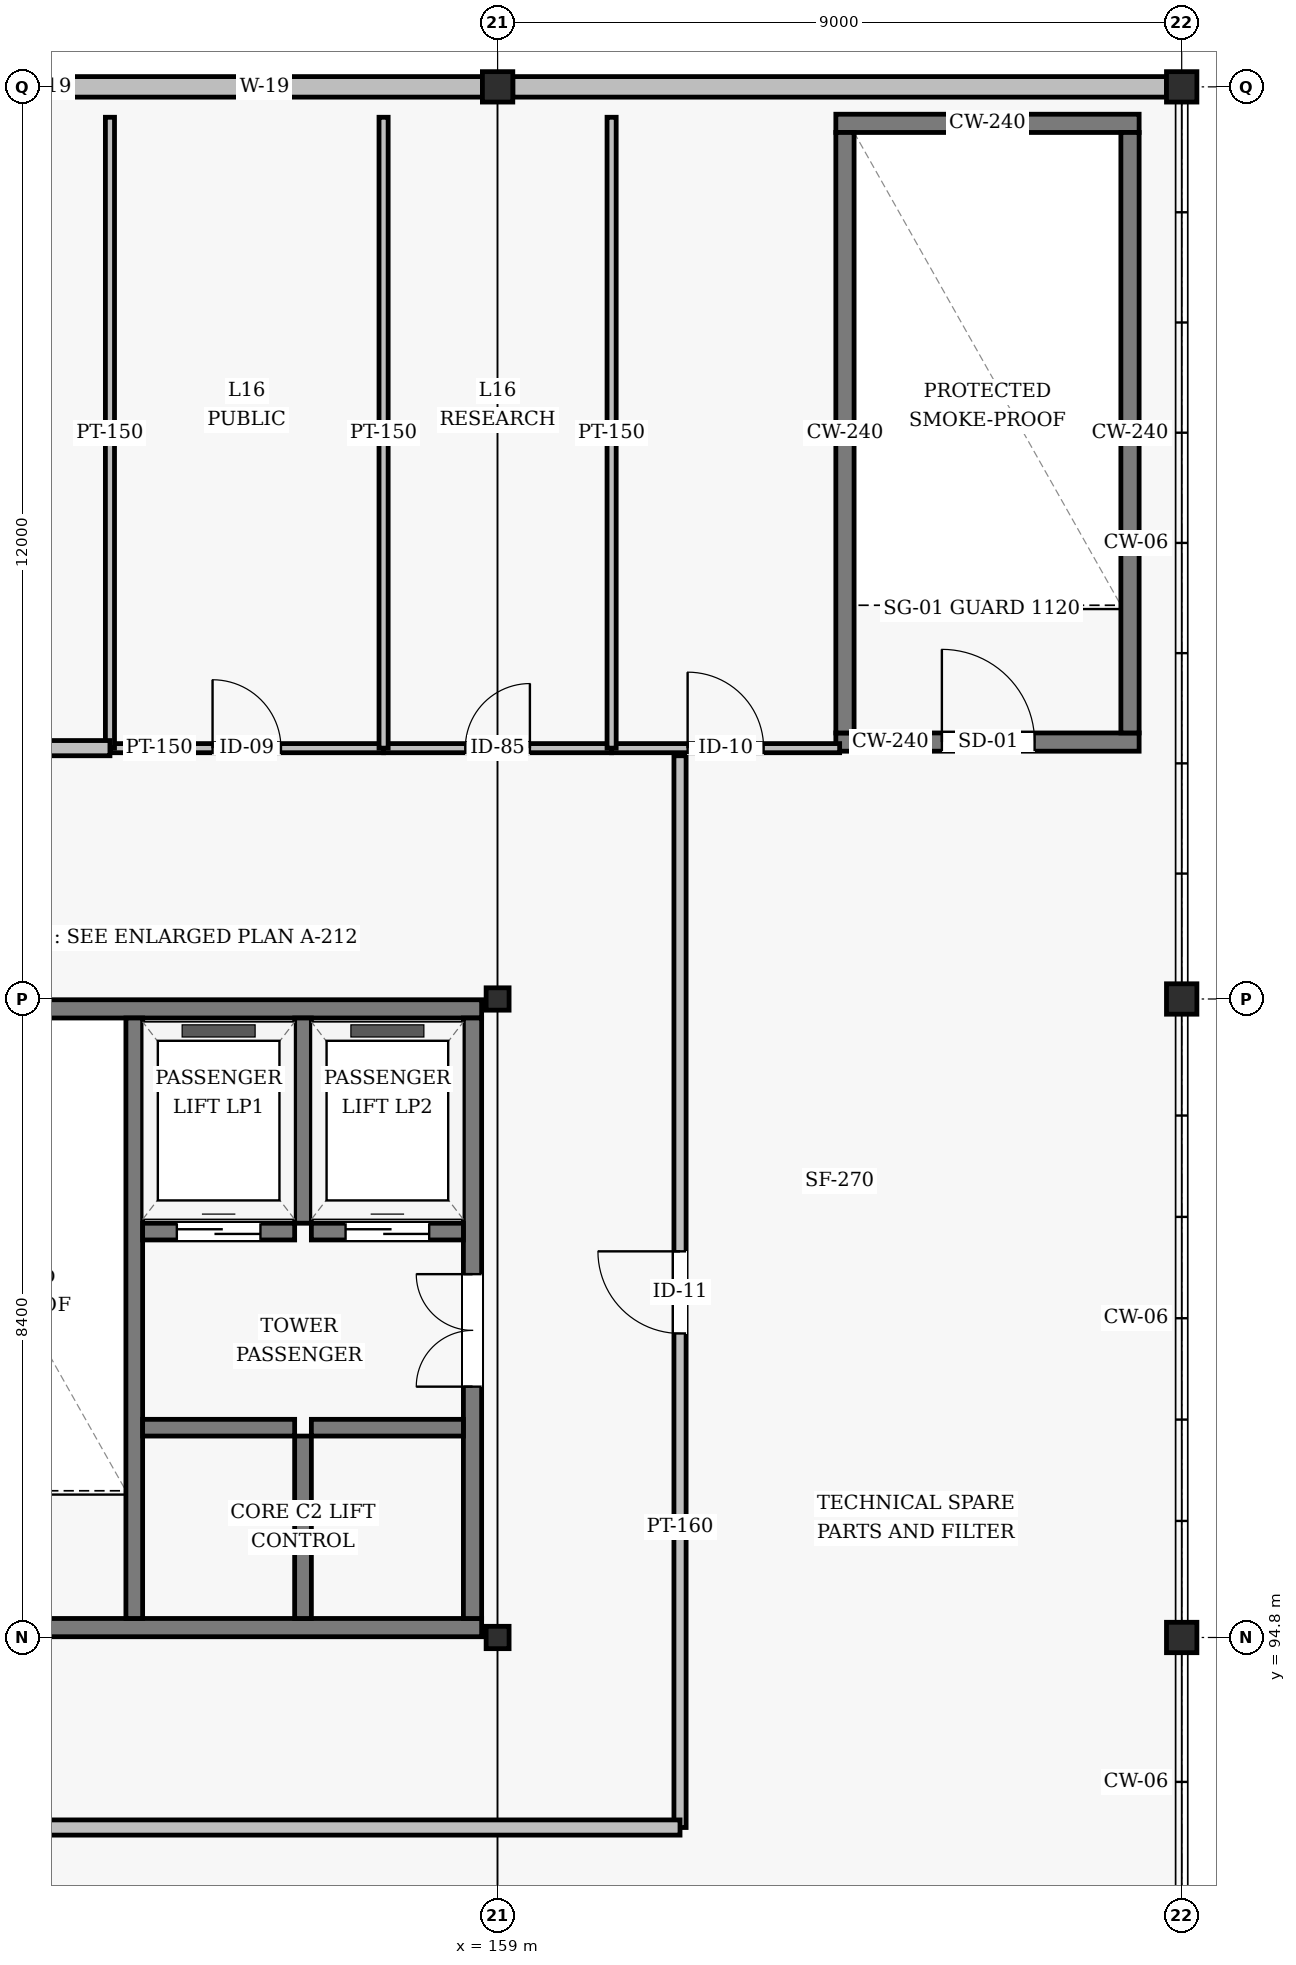
"""IFC4 building model, lengths in metres.
Left out: names, types, materials, properties, quantities, classifications, styles, units other than length and angle.
Written with IfcOpenShell. Run it as: python <this file> out.ifc"""

import sys

from ifc_helpers import new_model, si_unit, direction, frame, frame_2d, origin, origin_2d, place, context, subcontext, project, spatial, rectangle, hollow_rectangle, i_section, extrude, element, fill, save


model = new_model("IFC4")
c1 = context("Model", 3, precision=1e-05, world=origin(), true_north=direction((0.0, 1.0)))
c2 = subcontext(c1, "Body", "Model", "MODEL_VIEW")
j1 = project(units=[si_unit("LENGTHUNIT", "METRE"), si_unit("PLANEANGLEUNIT", "RADIAN")], contexts=[c1])
p1 = place(None, origin())
s1 = spatial("IfcSite", under=j1, at=p1, CompositionType="ELEMENT")
p2 = place(p1, origin())
s2 = spatial("IfcBuilding", under=s1, at=p2, CompositionType="ELEMENT")
p3 = place(p2, frame((0.0, 0.0, 61.2)))
s3 = spatial("IfcBuildingStorey", under=s2, at=p3, CompositionType="ELEMENT", Elevation=61.2)
for number, where, z_axis, x_axis in (
    (1, (159.0, 94.8, 0.0), (0.0, 0.0, 1.0), (1.0, 0.0, 0.0)),
    (2, (159.0, 103.2, 0.0), (0.0, 0.0, 1.0), (1.0, 0.0, 0.0)),
):
    element("IfcColumn", number, at=place(p3, frame(where, z_axis=z_axis, x_axis=x_axis)), inside=s3, PredefinedType="COLUMN", context=c2, shape_type="SweptSolid", body=[
        extrude(i_section(OverallWidth=0.302, OverallDepth=0.294, WebThickness=0.012, FlangeThickness=0.012, FilletRadius=0.018, at=origin_2d()), origin(), (0.0, 0.0, 1.0), 4.2),
    ])
for number, where, z_axis, x_axis in (
    (3, (159.0, 115.2, 0.0), (0.0, 0.0, 1.0), (1.0, 0.0, 0.0)),
    (4, (168.0, 94.8, 0.0), (0.0, 0.0, 1.0), (1.0, 0.0, 0.0)),
    (5, (168.0, 103.2, 0.0), (0.0, 0.0, 1.0), (1.0, 0.0, 0.0)),
    (6, (168.0, 115.2, 0.0), (0.0, 0.0, 1.0), (1.0, 0.0, 0.0)),
):
    element("IfcColumn", number, at=place(p3, frame(where, z_axis=z_axis, x_axis=x_axis)), inside=s3, PredefinedType="COLUMN", context=c2, shape_type="SweptSolid", body=[
        extrude(hollow_rectangle(XDim=0.4, YDim=0.4, WallThickness=0.016, InnerFilletRadius=0.016, OuterFilletRadius=0.032, at=origin_2d()), origin(), (0.0, 0.0, 1.0), 4.2),
    ])
p4 = place(p3, frame((167.8, 115.2, 0.0), z_axis=(0.0, 0.0, 1.0), x_axis=(-1.0, 0.0, 0.0)))
e7 = element("IfcWall", 7, at=p4, inside=s3, PredefinedType="SOLIDWALL", context=c2, shape_type="SweptSolid", body=[
    extrude(rectangle(XDim=8.6, YDim=0.27, at=frame_2d((4.3, 0.0))), origin(), (0.0, 0.0, 1.0), 3.51),
])
p5 = place(p3, frame((158.8, 115.2, 0.0), z_axis=(0.0, 0.0, 1.0), x_axis=(-1.0, 0.0, 0.0)))
e8 = element("IfcWall", 8, at=p5, inside=s3, PredefinedType="SOLIDWALL", context=c2, shape_type="SweptSolid", body=[
    extrude(rectangle(XDim=8.6, YDim=0.27, at=frame_2d((4.3, 0.0))), origin(), (0.0, 0.0, 1.0), 3.51),
])
p6 = place(p5, frame((2.542, 0.0, 1.35)))
e9 = element("IfcOpeningElement", 9, at=p6, cuts=e8, PredefinedType="OPENING", context=c2, shape_type="SweptSolid", body=[
    extrude(rectangle(XDim=0.65, YDim=1.2, at=frame_2d((0.325, 0.6))), frame((0.0, 0.145, 0.0), z_axis=(0.0, -1.0, 0.0), x_axis=(1.0, 0.0, 0.0)), (0.0, 0.0, 1.0), 0.29),
])
p7 = place(p5, frame((5.408, 0.0, 1.35)))
e10 = element("IfcOpeningElement", 10, at=p7, cuts=e8, PredefinedType="OPENING", context=c2, shape_type="SweptSolid", body=[
    extrude(rectangle(XDim=0.65, YDim=1.2, at=frame_2d((0.325, 0.6))), frame((0.0, 0.145, 0.0), z_axis=(0.0, -1.0, 0.0), x_axis=(1.0, 0.0, 0.0)), (0.0, 0.0, 1.0), 0.29),
])
p8 = place(p3, frame((150.02, 94.93, 0.0), z_axis=(0.0, 0.0, 1.0), x_axis=(1.0, 0.0, 0.0)))
e11 = element("IfcWall", 11, at=p8, inside=s3, PredefinedType="SHEAR", context=c2, shape_type="SweptSolid", body=[
    extrude(rectangle(XDim=8.77, YDim=0.24, at=frame_2d((4.385, 0.0))), origin(), (0.0, 0.0, 1.0), 3.96),
])
p9 = place(p8, frame((1.79, 0.0, 0.0)))
e12 = element("IfcOpeningElement", 12, at=p9, cuts=e11, PredefinedType="OPENING", context=c2, shape_type="SweptSolid", body=[
    extrude(rectangle(XDim=1.22, YDim=2.18, at=frame_2d((0.61, 1.09))), frame((0.0, 0.13, 0.0), z_axis=(0.0, -1.0, 0.0), x_axis=(1.0, 0.0, 0.0)), (0.0, 0.0, 1.0), 0.26),
])
p10 = place(p3, frame((150.02, 103.07, 0.0), z_axis=(0.0, 0.0, 1.0), x_axis=(1.0, 0.0, 0.0)))
e13 = element("IfcWall", 13, at=p10, inside=s3, PredefinedType="SHEAR", context=c2, shape_type="SweptSolid", body=[
    extrude(rectangle(XDim=8.77, YDim=0.24, at=frame_2d((4.385, 0.0))), origin(), (0.0, 0.0, 1.0), 3.96),
])
p11 = place(p3, frame((154.22, 95.05, 0.0), z_axis=(0.0, 0.0, 1.0), x_axis=(0.0, 1.0, 0.0)))
e14 = element("IfcWall", 14, at=p11, inside=s3, PredefinedType="SHEAR", context=c2, shape_type="SweptSolid", body=[
    extrude(rectangle(XDim=7.9, YDim=0.22, at=frame_2d((3.95, 0.0))), origin(), (0.0, 0.0, 1.0), 3.96),
])
p12 = place(p3, frame((158.67, 95.05, 0.0), z_axis=(0.0, 0.0, 1.0), x_axis=(0.0, 1.0, 0.0)))
e15 = element("IfcWall", 15, at=p12, inside=s3, PredefinedType="SHEAR", context=c2, shape_type="SweptSolid", body=[
    extrude(rectangle(XDim=7.9, YDim=0.24, at=frame_2d((3.95, 0.0))), origin(), (0.0, 0.0, 1.0), 3.96),
])
p13 = place(p12, frame((3.05, 0.0, 0.0)))
e16 = element("IfcOpeningElement", 16, at=p13, cuts=e15, PredefinedType="OPENING", context=c2, shape_type="SweptSolid", body=[
    extrude(rectangle(XDim=1.48, YDim=2.22, at=frame_2d((0.74, 1.11))), frame((0.0, 0.13, 0.0), z_axis=(0.0, -1.0, 0.0), x_axis=(1.0, 0.0, 0.0)), (0.0, 0.0, 1.0), 0.26),
])
p14 = place(p3, frame((156.44, 100.25, 0.0), z_axis=(0.0, 0.0, 1.0), x_axis=(0.0, 1.0, 0.0)))
e17 = element("IfcWall", 17, at=p14, inside=s3, PredefinedType="SHEAR", context=c2, shape_type="SweptSolid", body=[
    extrude(rectangle(XDim=2.7, YDim=0.22, at=frame_2d((1.35, 0.0))), origin(), (0.0, 0.0, 1.0), 3.96),
])
p15 = place(p3, frame((154.33, 100.14, 0.0), z_axis=(0.0, 0.0, 1.0), x_axis=(1.0, 0.0, 0.0)))
e18 = element("IfcWall", 18, at=p15, inside=s3, PredefinedType="SHEAR", context=c2, shape_type="SweptSolid", body=[
    extrude(rectangle(XDim=2.0, YDim=0.22, at=frame_2d((1.0, 0.0))), origin(), (0.0, 0.0, 1.0), 3.96),
])
p16 = place(p15, frame((0.45, 0.0, 0.0)))
e19 = element("IfcOpeningElement", 19, at=p16, cuts=e18, PredefinedType="OPENING", context=c2, shape_type="SweptSolid", body=[
    extrude(rectangle(XDim=1.1, YDim=2.15, at=frame_2d((0.55, 1.075))), frame((0.0, 0.12, 0.0), z_axis=(0.0, -1.0, 0.0), x_axis=(1.0, 0.0, 0.0)), (0.0, 0.0, 1.0), 0.24),
])
p17 = place(p3, frame((156.55, 100.14, 0.0), z_axis=(0.0, 0.0, 1.0), x_axis=(1.0, 0.0, 0.0)))
e20 = element("IfcWall", 20, at=p17, inside=s3, PredefinedType="SHEAR", context=c2, shape_type="SweptSolid", body=[
    extrude(rectangle(XDim=2.0, YDim=0.22, at=frame_2d((1.0, 0.0))), origin(), (0.0, 0.0, 1.0), 3.96),
])
p18 = place(p17, frame((0.45, 0.0, 0.0)))
e21 = element("IfcOpeningElement", 21, at=p18, cuts=e20, PredefinedType="OPENING", context=c2, shape_type="SweptSolid", body=[
    extrude(rectangle(XDim=1.1, YDim=2.15, at=frame_2d((0.55, 1.075))), frame((0.0, 0.12, 0.0), z_axis=(0.0, -1.0, 0.0), x_axis=(1.0, 0.0, 0.0)), (0.0, 0.0, 1.0), 0.24),
])
p19 = place(p3, frame((156.44, 95.05, 0.0), z_axis=(0.0, 0.0, 1.0), x_axis=(0.0, 1.0, 0.0)))
e22 = element("IfcWall", 22, at=p19, inside=s3, PredefinedType="SHEAR", context=c2, shape_type="SweptSolid", body=[
    extrude(rectangle(XDim=2.4, YDim=0.22, at=frame_2d((1.2, 0.0))), origin(), (0.0, 0.0, 1.0), 3.96),
])
for number, where, z_axis, x_axis in (
    (23, (154.33, 97.56, 0.0), (0.0, 0.0, 1.0), (1.0, 0.0, 0.0)),
    (24, (156.55, 97.56, 0.0), (0.0, 0.0, 1.0), (1.0, 0.0, 0.0)),
):
    element("IfcWall", number, at=place(p3, frame(where, z_axis=z_axis, x_axis=x_axis)), inside=s3, PredefinedType="SHEAR", context=c2, shape_type="SweptSolid", body=[
        extrude(rectangle(XDim=2.0, YDim=0.22, at=frame_2d((1.0, 0.0))), origin(), (0.0, 0.0, 1.0), 3.96),
    ])
p20 = place(p3, frame((163.45, 106.58, 0.0), z_axis=(0.0, 0.0, 1.0), x_axis=(1.0, 0.0, 0.0)))
e25 = element("IfcWall", 25, at=p20, inside=s3, PredefinedType="SHEAR", context=c2, shape_type="SweptSolid", body=[
    extrude(rectangle(XDim=3.99, YDim=0.24, at=frame_2d((1.995, 0.0))), origin(), (0.0, 0.0, 1.0), 3.96),
])
p21 = place(p20, frame((1.395, 0.0, 0.0)))
e26 = element("IfcOpeningElement", 26, at=p21, cuts=e25, PredefinedType="OPENING", context=c2, shape_type="SweptSolid", body=[
    extrude(rectangle(XDim=1.22, YDim=2.18, at=frame_2d((0.61, 1.09))), frame((0.0, 0.13, 0.0), z_axis=(0.0, -1.0, 0.0), x_axis=(1.0, 0.0, 0.0)), (0.0, 0.0, 1.0), 0.26),
])
p22 = place(p3, frame((163.45, 114.72, 0.0), z_axis=(0.0, 0.0, 1.0), x_axis=(1.0, 0.0, 0.0)))
e27 = element("IfcWall", 27, at=p22, inside=s3, PredefinedType="SHEAR", context=c2, shape_type="SweptSolid", body=[
    extrude(rectangle(XDim=3.99, YDim=0.24, at=frame_2d((1.995, 0.0))), origin(), (0.0, 0.0, 1.0), 3.96),
])
for number, where, z_axis, x_axis in (
    (28, (163.57, 106.7, 0.0), (0.0, 0.0, 1.0), (0.0, 1.0, 0.0)),
    (29, (167.32, 106.7, 0.0), (0.0, 0.0, 1.0), (0.0, 1.0, 0.0)),
):
    element("IfcWall", number, at=place(p3, frame(where, z_axis=z_axis, x_axis=x_axis)), inside=s3, PredefinedType="SHEAR", context=c2, shape_type="SweptSolid", body=[
        extrude(rectangle(XDim=7.9, YDim=0.24, at=frame_2d((3.95, 0.0))), origin(), (0.0, 0.0, 1.0), 3.96),
    ])
p23 = place(p3, frame((153.9, 106.5, 0.0), z_axis=(0.0, 0.0, 1.0), x_axis=(1.0, 0.0, 0.0)))
e30 = element("IfcWall", 30, at=p23, inside=s3, PredefinedType="PARTITIONING", context=c2, shape_type="SweptSolid", body=[
    extrude(rectangle(XDim=3.6, YDim=0.12, at=frame_2d((1.8, 0.0))), origin(), (0.0, 0.0, 1.0), 3.96),
])
p24 = place(p23, frame((1.35, 0.0, 0.0)))
e31 = element("IfcOpeningElement", 31, at=p24, cuts=e30, PredefinedType="OPENING", context=c2, shape_type="SweptSolid", body=[
    extrude(rectangle(XDim=0.9, YDim=2.1, at=frame_2d((0.45, 1.05))), frame((0.0, 0.07, 0.0), z_axis=(0.0, -1.0, 0.0), x_axis=(1.0, 0.0, 0.0)), (0.0, 0.0, 1.0), 0.14),
])
p25 = place(p3, frame((157.5, 106.5, 0.0), z_axis=(0.0, 0.0, 1.0), x_axis=(1.0, 0.0, 0.0)))
e32 = element("IfcWall", 32, at=p25, inside=s3, PredefinedType="PARTITIONING", context=c2, shape_type="SweptSolid", body=[
    extrude(rectangle(XDim=3.0, YDim=0.12, at=frame_2d((1.5, 0.0))), origin(), (0.0, 0.0, 1.0), 3.51),
])
p26 = place(p25, frame((1.075, 0.0, 0.0)))
e33 = element("IfcOpeningElement", 33, at=p26, cuts=e32, PredefinedType="OPENING", context=c2, shape_type="SweptSolid", body=[
    extrude(rectangle(XDim=0.85, YDim=2.1, at=frame_2d((0.425, 1.05))), frame((0.0, 0.07, 0.0), z_axis=(0.0, -1.0, 0.0), x_axis=(1.0, 0.0, 0.0)), (0.0, 0.0, 1.0), 0.14),
])
p27 = place(p3, frame((160.5, 106.5, 0.0), z_axis=(0.0, 0.0, 1.0), x_axis=(1.0, 0.0, 0.0)))
e34 = element("IfcWall", 34, at=p27, inside=s3, PredefinedType="PARTITIONING", context=c2, shape_type="SweptSolid", body=[
    extrude(rectangle(XDim=3.0, YDim=0.12, at=frame_2d((1.5, 0.0))), origin(), (0.0, 0.0, 1.0), 3.96),
])
p28 = place(p27, frame((1.0, 0.0, 0.0)))
e35 = element("IfcOpeningElement", 35, at=p28, cuts=e34, PredefinedType="OPENING", context=c2, shape_type="SweptSolid", body=[
    extrude(rectangle(XDim=1.0, YDim=2.1, at=frame_2d((0.5, 1.05))), frame((0.0, 0.07, 0.0), z_axis=(0.0, -1.0, 0.0), x_axis=(1.0, 0.0, 0.0)), (0.0, 0.0, 1.0), 0.14),
])
for number, where, z_axis, x_axis in (
    (36, (153.9, 106.5, 0.0), (0.0, 0.0, 1.0), (0.0, 1.0, 0.0)),
    (37, (157.5, 106.5, 0.0), (0.0, 0.0, 1.0), (0.0, 1.0, 0.0)),
    (38, (160.5, 106.5, 0.0), (0.0, 0.0, 1.0), (0.0, 1.0, 0.0)),
):
    element("IfcWall", number, at=place(p3, frame(where, z_axis=z_axis, x_axis=x_axis)), inside=s3, PredefinedType="PARTITIONING", context=c2, shape_type="SweptSolid", body=[
        extrude(rectangle(XDim=8.3, YDim=0.12, at=frame_2d((4.15, 0.0))), origin(), (0.0, 0.0, 1.0), 3.96),
    ])
p29 = place(p3, frame((161.4, 92.3, 0.0), z_axis=(0.0, 0.0, 1.0), x_axis=(0.0, 1.0, 0.0)))
e39 = element("IfcWall", 39, at=p29, inside=s3, PredefinedType="PARTITIONING", context=c2, shape_type="SweptSolid", body=[
    extrude(rectangle(XDim=14.1, YDim=0.16, at=frame_2d((7.05, 0.0))), origin(), (0.0, 0.0, 1.0), 3.51),
])
p30 = place(p29, frame((6.5, 0.0, 0.0)))
e40 = element("IfcOpeningElement", 40, at=p30, cuts=e39, PredefinedType="OPENING", context=c2, shape_type="SweptSolid", body=[
    extrude(rectangle(XDim=1.08, YDim=2.08, at=frame_2d((0.54, 1.04))), frame((0.0, 0.09, 0.0), z_axis=(0.0, -1.0, 0.0), x_axis=(1.0, 0.0, 0.0)), (0.0, 0.0, 1.0), 0.18),
])
p31 = place(p3, frame((141.9, 92.3, 0.0), z_axis=(0.0, 0.0, 1.0), x_axis=(1.0, 0.0, 0.0)))
e41 = element("IfcWall", 41, at=p31, inside=s3, PredefinedType="SOLIDWALL", context=c2, shape_type="SweptSolid", body=[
    extrude(rectangle(XDim=19.5, YDim=0.2, at=frame_2d((9.75, 0.0))), origin(), (0.0, 0.0, 1.0), 3.51),
])
p32 = place(p31, frame((9.05, 0.0, 0.0)))
e42 = element("IfcOpeningElement", 42, at=p32, cuts=e41, PredefinedType="OPENING", context=c2, shape_type="SweptSolid", body=[
    extrude(rectangle(XDim=1.38, YDim=2.15, at=frame_2d((0.69, 1.075))), frame((0.0, 0.11, 0.0), z_axis=(0.0, -1.0, 0.0), x_axis=(1.0, 0.0, 0.0)), (0.0, 0.0, 1.0), 0.22),
])
p33 = place(p3, frame((144.9, 106.5, 0.0), z_axis=(0.0, 0.0, 1.0), x_axis=(1.0, 0.0, 0.0)))
e43 = element("IfcWall", 43, at=p33, inside=s3, PredefinedType="SOLIDWALL", context=c2, shape_type="SweptSolid", body=[
    extrude(rectangle(XDim=9.0, YDim=0.2, at=frame_2d((4.5, 0.0))), origin(), (0.0, 0.0, 1.0), 3.51),
])
p34 = place(p33, frame((3.9, 0.0, 0.0)))
e44 = element("IfcOpeningElement", 44, at=p34, cuts=e43, PredefinedType="OPENING", context=c2, shape_type="SweptSolid", body=[
    extrude(rectangle(XDim=1.18, YDim=2.15, at=frame_2d((0.59, 1.075))), frame((0.0, 0.11, 0.0), z_axis=(0.0, -1.0, 0.0), x_axis=(1.0, 0.0, 0.0)), (0.0, 0.0, 1.0), 0.22),
])
p35 = place(p6, origin())
e45 = element("IfcWindow", 45, at=p35, inside=s3, PartitioningType="SINGLE_PANEL", PredefinedType="WINDOW", context=c2, shape_type="SweptSolid", body=[
    extrude(rectangle(XDim=0.65, YDim=1.2, at=frame_2d((0.325, 0.6))), frame((0.0, 0.03, 0.0), z_axis=(0.0, -1.0, 0.0), x_axis=(1.0, 0.0, 0.0)), (0.0, 0.0, 1.0), 0.06),
])
fill(e9, e45)
p36 = place(p7, origin())
e46 = element("IfcWindow", 46, at=p36, inside=s3, PartitioningType="SINGLE_PANEL", PredefinedType="WINDOW", context=c2, shape_type="SweptSolid", body=[
    extrude(rectangle(XDim=0.65, YDim=1.2, at=frame_2d((0.325, 0.6))), frame((0.0, 0.03, 0.0), z_axis=(0.0, -1.0, 0.0), x_axis=(1.0, 0.0, 0.0)), (0.0, 0.0, 1.0), 0.06),
])
fill(e10, e46)
p37 = place(p13, origin())
e47 = element("IfcDoor", 47, at=p37, inside=s3, OperationType="DOUBLE_DOOR_SINGLE_SWING", PredefinedType="DOOR", context=c2, shape_type="SweptSolid", body=[
    extrude(rectangle(XDim=1.48, YDim=2.22, at=frame_2d((0.74, 1.11))), frame((0.0, 0.025, 0.0), z_axis=(0.0, -1.0, 0.0), x_axis=(1.0, 0.0, 0.0)), (0.0, 0.0, 1.0), 0.05),
])
fill(e16, e47)
p38 = place(p16, origin())
e48 = element("IfcDoor", 48, at=p38, inside=s3, OperationType="SLIDING_TO_LEFT", PredefinedType="DOOR", context=c2, shape_type="SweptSolid", body=[
    extrude(rectangle(XDim=1.1, YDim=2.15, at=frame_2d((0.55, 1.075))), frame((0.0, 0.025, 0.0), z_axis=(0.0, -1.0, 0.0), x_axis=(1.0, 0.0, 0.0)), (0.0, 0.0, 1.0), 0.05),
])
fill(e19, e48)
p39 = place(p18, origin())
e49 = element("IfcDoor", 49, at=p39, inside=s3, OperationType="SLIDING_TO_LEFT", PredefinedType="DOOR", context=c2, shape_type="SweptSolid", body=[
    extrude(rectangle(XDim=1.1, YDim=2.15, at=frame_2d((0.55, 1.075))), frame((0.0, 0.025, 0.0), z_axis=(0.0, -1.0, 0.0), x_axis=(1.0, 0.0, 0.0)), (0.0, 0.0, 1.0), 0.05),
])
fill(e21, e49)
p40 = place(p21, origin())
e50 = element("IfcDoor", 50, at=p40, inside=s3, OperationType="SINGLE_SWING_LEFT", PredefinedType="DOOR", context=c2, shape_type="SweptSolid", body=[
    extrude(rectangle(XDim=1.22, YDim=2.18, at=frame_2d((0.61, 1.09))), frame((0.0, 0.025, 0.0), z_axis=(0.0, -1.0, 0.0), x_axis=(1.0, 0.0, 0.0)), (0.0, 0.0, 1.0), 0.05),
])
fill(e26, e50)
p41 = place(p24, origin())
e51 = element("IfcDoor", 51, at=p41, inside=s3, OperationType="SINGLE_SWING_LEFT", PredefinedType="DOOR", context=c2, shape_type="SweptSolid", body=[
    extrude(rectangle(XDim=0.9, YDim=2.1, at=frame_2d((0.45, 1.05))), frame((0.0, 0.025, 0.0), z_axis=(0.0, -1.0, 0.0), x_axis=(1.0, 0.0, 0.0)), (0.0, 0.0, 1.0), 0.05),
])
fill(e31, e51)
p42 = place(p26, origin())
e52 = element("IfcDoor", 52, at=p42, inside=s3, OperationType="SINGLE_SWING_RIGHT", PredefinedType="DOOR", context=c2, shape_type="SweptSolid", body=[
    extrude(rectangle(XDim=0.85, YDim=2.1, at=frame_2d((0.425, 1.05))), frame((0.0, 0.025, 0.0), z_axis=(0.0, -1.0, 0.0), x_axis=(1.0, 0.0, 0.0)), (0.0, 0.0, 1.0), 0.05),
])
fill(e33, e52)
p43 = place(p28, origin())
e53 = element("IfcDoor", 53, at=p43, inside=s3, OperationType="SINGLE_SWING_LEFT", PredefinedType="DOOR", context=c2, shape_type="SweptSolid", body=[
    extrude(rectangle(XDim=1.0, YDim=2.1, at=frame_2d((0.5, 1.05))), frame((0.0, 0.025, 0.0), z_axis=(0.0, -1.0, 0.0), x_axis=(1.0, 0.0, 0.0)), (0.0, 0.0, 1.0), 0.05),
])
fill(e35, e53)
p44 = place(p30, origin())
e54 = element("IfcDoor", 54, at=p44, inside=s3, OperationType="SINGLE_SWING_RIGHT", PredefinedType="DOOR", context=c2, shape_type="SweptSolid", body=[
    extrude(rectangle(XDim=1.08, YDim=2.08, at=frame_2d((0.54, 1.04))), frame((0.0, 0.025, 0.0), z_axis=(0.0, -1.0, 0.0), x_axis=(1.0, 0.0, 0.0)), (0.0, 0.0, 1.0), 0.05),
])
fill(e40, e54)
save(model, sys.argv[1])
